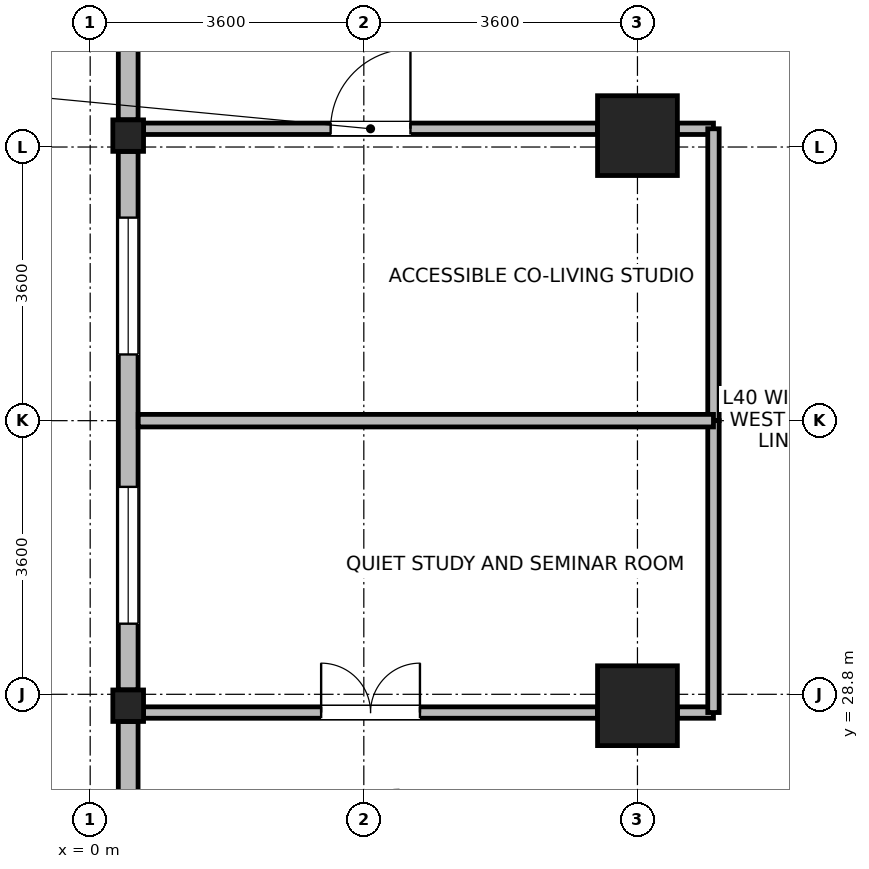
"""IFC4 building model, lengths in metres.
Left out: names, types, materials, properties, quantities, classifications, styles, units other than length and angle.
Written with IfcOpenShell. Run it as: python <this file> out.ifc"""

import sys

from ifc_helpers import new_model, si_unit, direction, frame, frame_2d, origin, origin_2d, place, context, subcontext, project, spatial, rectangle, i_section, extrude, source, transform, mapped, element, fill, save


model = new_model("IFC4")
c1 = context("Model", 3, precision=1e-05, world=origin(), true_north=direction((0.0, 1.0)))
c2 = subcontext(c1, "Body", "Model", "MODEL_VIEW")
j1 = project(units=[si_unit("LENGTHUNIT", "METRE"), si_unit("PLANEANGLEUNIT", "RADIAN")], contexts=[c1])
p1 = place(None, origin())
s1 = spatial("IfcSite", under=j1, at=p1, CompositionType="ELEMENT")
p2 = place(p1, origin())
s2 = spatial("IfcBuilding", under=s1, at=p2, CompositionType="ELEMENT")
p3 = place(p2, frame((0.0, 0.0, 158.7)))
s3 = spatial("IfcBuildingStorey", under=s2, at=p3, CompositionType="ELEMENT", Elevation=158.7)
m1 = source(origin(), c2, "Body", "SweptSolid", [
    extrude(rectangle(XDim=1.05, YDim=1.05, at=origin_2d()), origin(), (0.0, 0.0, 1.0), 3.7),
])
for number, where, z_axis, x_axis in (
    (1, (7.2, 28.65, 0.0), (0.0, 0.0, 1.0), (1.0, 0.0, 0.0)),
    (2, (7.2, 36.15, 0.0), (0.0, 0.0, 1.0), (1.0, 0.0, 0.0)),
):
    element("IfcColumn", number, at=place(p3, frame(where, z_axis=z_axis, x_axis=x_axis)), inside=s3, PredefinedType="COLUMN", context=c2, shape_type="MappedRepresentation", body=[
        mapped(m1, transform((0.0, 0.0, 0.0), x_axis=(1.0, 0.0, 0.0), y_axis=(0.0, 1.0, 0.0), z_axis=(0.0, 0.0, 1.0), scale=1.0)),
    ])
m2 = source(origin(), c2, "Body", "SweptSolid", [
    extrude(i_section(OverallWidth=0.404, OverallDepth=0.414, WebThickness=0.021, FlangeThickness=0.028, FilletRadius=0.015, at=origin_2d()), origin(), (0.0, 0.0, 1.0), 3.7),
])
for number, where, z_axis, x_axis in (
    (3, (0.5, 28.65, 0.0), (0.0, 0.0, 1.0), (1.0, 0.0, 0.0)),
    (4, (0.5, 36.15, 0.0), (0.0, 0.0, 1.0), (1.0, 0.0, 0.0)),
):
    element("IfcColumn", number, at=place(p3, frame(where, z_axis=z_axis, x_axis=x_axis)), inside=s3, PredefinedType="COLUMN", context=c2, shape_type="MappedRepresentation", body=[
        mapped(m2, transform((0.0, 0.0, 0.0), x_axis=(1.0, 0.0, 0.0), y_axis=(0.0, 1.0, 0.0), z_axis=(0.0, 0.0, 1.0), scale=1.0)),
    ])
p4 = place(p3, frame((0.5, 36.358, 0.0), z_axis=(0.0, 0.0, 1.0), x_axis=(0.0, 1.0, 0.0)))
e5 = element("IfcWall", 5, at=p4, inside=s3, PredefinedType="STANDARD", context=c2, shape_type="SweptSolid", body=[
    extrude(rectangle(XDim=6.972, YDim=0.26, at=frame_2d((3.486, 0.0))), origin(), (0.0, 0.0, 1.0), 3.44),
])
p5 = place(p4, frame((4.329, 0.0, 0.85)))
e6 = element("IfcOpeningElement", 6, at=p5, cuts=e5, PredefinedType="OPENING", context=c2, shape_type="SweptSolid", body=[
    extrude(rectangle(XDim=1.8, YDim=1.85, at=frame_2d((0.9, 0.925))), frame((0.0, 0.14, 0.0), z_axis=(0.0, -1.0, 0.0), x_axis=(1.0, 0.0, 0.0)), (0.0, 0.0, 1.0), 0.28),
])
p6 = place(p4, frame((3.011, 0.0, 0.85)))
e7 = element("IfcOpeningElement", 7, at=p6, cuts=e5, PredefinedType="OPENING", context=c2, shape_type="SweptSolid", body=[
    extrude(rectangle(XDim=0.95, YDim=1.75, at=frame_2d((0.475, 0.875))), frame((0.0, 0.14, 0.0), z_axis=(0.0, -1.0, 0.0), x_axis=(1.0, 0.0, 0.0)), (0.0, 0.0, 1.0), 0.28),
])
p7 = place(p3, frame((0.5, 28.858, 0.0), z_axis=(0.0, 0.0, 1.0), x_axis=(0.0, 1.0, 0.0)))
e8 = element("IfcWall", 8, at=p7, inside=s3, PredefinedType="STANDARD", context=c2, shape_type="SweptSolid", body=[
    extrude(rectangle(XDim=7.084, YDim=0.26, at=frame_2d((3.542, 0.0))), origin(), (0.0, 0.0, 1.0), 2.99),
])
p8 = place(p7, frame((0.871, 0.0, 0.85)))
e9 = element("IfcOpeningElement", 9, at=p8, cuts=e8, PredefinedType="OPENING", context=c2, shape_type="SweptSolid", body=[
    extrude(rectangle(XDim=1.8, YDim=1.85, at=frame_2d((0.9, 0.925))), frame((0.0, 0.14, 0.0), z_axis=(0.0, -1.0, 0.0), x_axis=(1.0, 0.0, 0.0)), (0.0, 0.0, 1.0), 0.28),
])
p9 = place(p7, frame((4.413, 0.0, 0.85)))
e10 = element("IfcOpeningElement", 10, at=p9, cuts=e8, PredefinedType="OPENING", context=c2, shape_type="SweptSolid", body=[
    extrude(rectangle(XDim=1.8, YDim=1.85, at=frame_2d((0.9, 0.925))), frame((0.0, 0.14, 0.0), z_axis=(0.0, -1.0, 0.0), x_axis=(1.0, 0.0, 0.0)), (0.0, 0.0, 1.0), 0.28),
])
p10 = place(p3, frame((0.5, 21.47, 0.0), z_axis=(0.0, 0.0, 1.0), x_axis=(0.0, 1.0, 0.0)))
e11 = element("IfcWall", 11, at=p10, inside=s3, PredefinedType="STANDARD", context=c2, shape_type="SweptSolid", body=[
    extrude(rectangle(XDim=6.972, YDim=0.26, at=frame_2d((3.486, 0.0))), origin(), (0.0, 0.0, 1.0), 3.44),
])
p11 = place(p10, frame((0.843, 0.0, 0.85)))
e12 = element("IfcOpeningElement", 12, at=p11, cuts=e11, PredefinedType="OPENING", context=c2, shape_type="SweptSolid", body=[
    extrude(rectangle(XDim=1.8, YDim=1.85, at=frame_2d((0.9, 0.925))), frame((0.0, 0.14, 0.0), z_axis=(0.0, -1.0, 0.0), x_axis=(1.0, 0.0, 0.0)), (0.0, 0.0, 1.0), 0.28),
])
p12 = place(p10, frame((3.011, 0.0, 0.85)))
e13 = element("IfcOpeningElement", 13, at=p12, cuts=e11, PredefinedType="OPENING", context=c2, shape_type="SweptSolid", body=[
    extrude(rectangle(XDim=0.95, YDim=1.75, at=frame_2d((0.475, 0.875))), frame((0.0, 0.14, 0.0), z_axis=(0.0, -1.0, 0.0), x_axis=(1.0, 0.0, 0.0)), (0.0, 0.0, 1.0), 0.28),
])
p13 = place(p3, frame((0.702, 28.56, 0.0), z_axis=(0.0, 0.0, 1.0), x_axis=(1.0, 0.0, 0.0)))
e14 = element("IfcWall", 14, at=p13, inside=s3, PredefinedType="PARTITIONING", context=c2, shape_type="SweptSolid", body=[
    extrude(rectangle(XDim=5.973, YDim=0.15, at=frame_2d((2.987, 0.0))), origin(), (0.0, 0.0, 1.0), 2.84),
])
p14 = place(p13, frame((2.336, 0.0, 0.0)))
e15 = element("IfcOpeningElement", 15, at=p14, cuts=e14, PredefinedType="OPENING", context=c2, shape_type="SweptSolid", body=[
    extrude(rectangle(XDim=1.3, YDim=2.12, at=frame_2d((0.65, 1.06))), frame((0.0, 0.085, 0.0), z_axis=(0.0, -1.0, 0.0), x_axis=(1.0, 0.0, 0.0)), (0.0, 0.0, 1.0), 0.17),
])
p15 = place(p3, frame((7.725, 28.56, 0.0), z_axis=(0.0, 0.0, 1.0), x_axis=(1.0, 0.0, 0.0)))
e16 = element("IfcWall", 16, at=p15, inside=s3, PredefinedType="PARTITIONING", context=c2, shape_type="SweptSolid", body=[
    extrude(rectangle(XDim=0.475, YDim=0.15, at=frame_2d((0.237, 0.0))), origin(), (0.0, 0.0, 1.0), 2.84),
])
p16 = place(p3, frame((0.702, 36.24, 0.0), z_axis=(0.0, 0.0, 1.0), x_axis=(1.0, 0.0, 0.0)))
e17 = element("IfcWall", 17, at=p16, inside=s3, PredefinedType="PARTITIONING", context=c2, shape_type="SweptSolid", body=[
    extrude(rectangle(XDim=5.973, YDim=0.15, at=frame_2d((2.987, 0.0))), origin(), (0.0, 0.0, 1.0), 2.84),
])
p17 = place(p16, frame((2.461, 0.0, 0.0)))
e18 = element("IfcOpeningElement", 18, at=p17, cuts=e17, PredefinedType="OPENING", context=c2, shape_type="SweptSolid", body=[
    extrude(rectangle(XDim=1.05, YDim=2.12, at=frame_2d((0.525, 1.06))), frame((0.0, 0.085, 0.0), z_axis=(0.0, -1.0, 0.0), x_axis=(1.0, 0.0, 0.0)), (0.0, 0.0, 1.0), 0.17),
])
p18 = place(p3, frame((7.725, 36.24, 0.0), z_axis=(0.0, 0.0, 1.0), x_axis=(1.0, 0.0, 0.0)))
e19 = element("IfcWall", 19, at=p18, inside=s3, PredefinedType="PARTITIONING", context=c2, shape_type="SweptSolid", body=[
    extrude(rectangle(XDim=0.475, YDim=0.15, at=frame_2d((0.237, 0.0))), origin(), (0.0, 0.0, 1.0), 2.84),
])
p19 = place(p3, frame((8.2, 32.4, 0.0), z_axis=(0.0, 0.0, 1.0), x_axis=(0.0, 1.0, 0.0)))
e20 = element("IfcWall", 20, at=p19, inside=s3, PredefinedType="PARTITIONING", context=c2, shape_type="SweptSolid", body=[
    extrude(rectangle(XDim=3.84, YDim=0.15, at=frame_2d((1.92, 0.0))), origin(), (0.0, 0.0, 1.0), 3.44),
])
p20 = place(p3, frame((8.2, 28.56, 0.0), z_axis=(0.0, 0.0, 1.0), x_axis=(0.0, 1.0, 0.0)))
e21 = element("IfcWall", 21, at=p20, inside=s3, PredefinedType="PARTITIONING", context=c2, shape_type="SweptSolid", body=[
    extrude(rectangle(XDim=3.84, YDim=0.15, at=frame_2d((1.92, 0.0))), origin(), (0.0, 0.0, 1.0), 3.44),
])
p21 = place(p3, frame((0.632, 32.4, 0.0), z_axis=(0.0, 0.0, 1.0), x_axis=(1.0, 0.0, 0.0)))
e22 = element("IfcWall", 22, at=p21, inside=s3, PredefinedType="PARTITIONING", context=c2, shape_type="SweptSolid", body=[
    extrude(rectangle(XDim=7.568, YDim=0.165, at=frame_2d((3.784, 0.0))), origin(), (0.0, 0.0, 1.0), 3.44),
])
p22 = place(p8, origin())
e23 = element("IfcWindow", 23, at=p22, inside=s3, PartitioningType="SINGLE_PANEL", PredefinedType="WINDOW", context=c2, shape_type="SweptSolid", body=[
    extrude(rectangle(XDim=1.8, YDim=1.85, at=frame_2d((0.9, 0.925))), frame((0.0, 0.03, 0.0), z_axis=(0.0, -1.0, 0.0), x_axis=(1.0, 0.0, 0.0)), (0.0, 0.0, 1.0), 0.06),
])
fill(e9, e23)
p23 = place(p9, origin())
e24 = element("IfcWindow", 24, at=p23, inside=s3, PartitioningType="SINGLE_PANEL", PredefinedType="WINDOW", context=c2, shape_type="SweptSolid", body=[
    extrude(rectangle(XDim=1.8, YDim=1.85, at=frame_2d((0.9, 0.925))), frame((0.0, 0.03, 0.0), z_axis=(0.0, -1.0, 0.0), x_axis=(1.0, 0.0, 0.0)), (0.0, 0.0, 1.0), 0.06),
])
fill(e10, e24)
p24 = place(p14, origin())
e25 = element("IfcDoor", 25, at=p24, inside=s3, OperationType="DOUBLE_DOOR_SINGLE_SWING", PredefinedType="DOOR", context=c2, shape_type="SweptSolid", body=[
    extrude(rectangle(XDim=1.3, YDim=2.12, at=frame_2d((0.65, 1.06))), frame((0.0, 0.025, 0.0), z_axis=(0.0, -1.0, 0.0), x_axis=(1.0, 0.0, 0.0)), (0.0, 0.0, 1.0), 0.05),
])
fill(e15, e25)
p25 = place(p17, origin())
e26 = element("IfcDoor", 26, at=p25, inside=s3, OperationType="SINGLE_SWING_RIGHT", PredefinedType="DOOR", context=c2, shape_type="SweptSolid", body=[
    extrude(rectangle(XDim=1.05, YDim=2.12, at=frame_2d((0.525, 1.06))), frame((0.0, 0.025, 0.0), z_axis=(0.0, -1.0, 0.0), x_axis=(1.0, 0.0, 0.0)), (0.0, 0.0, 1.0), 0.05),
])
fill(e18, e26)
save(model, sys.argv[1])
